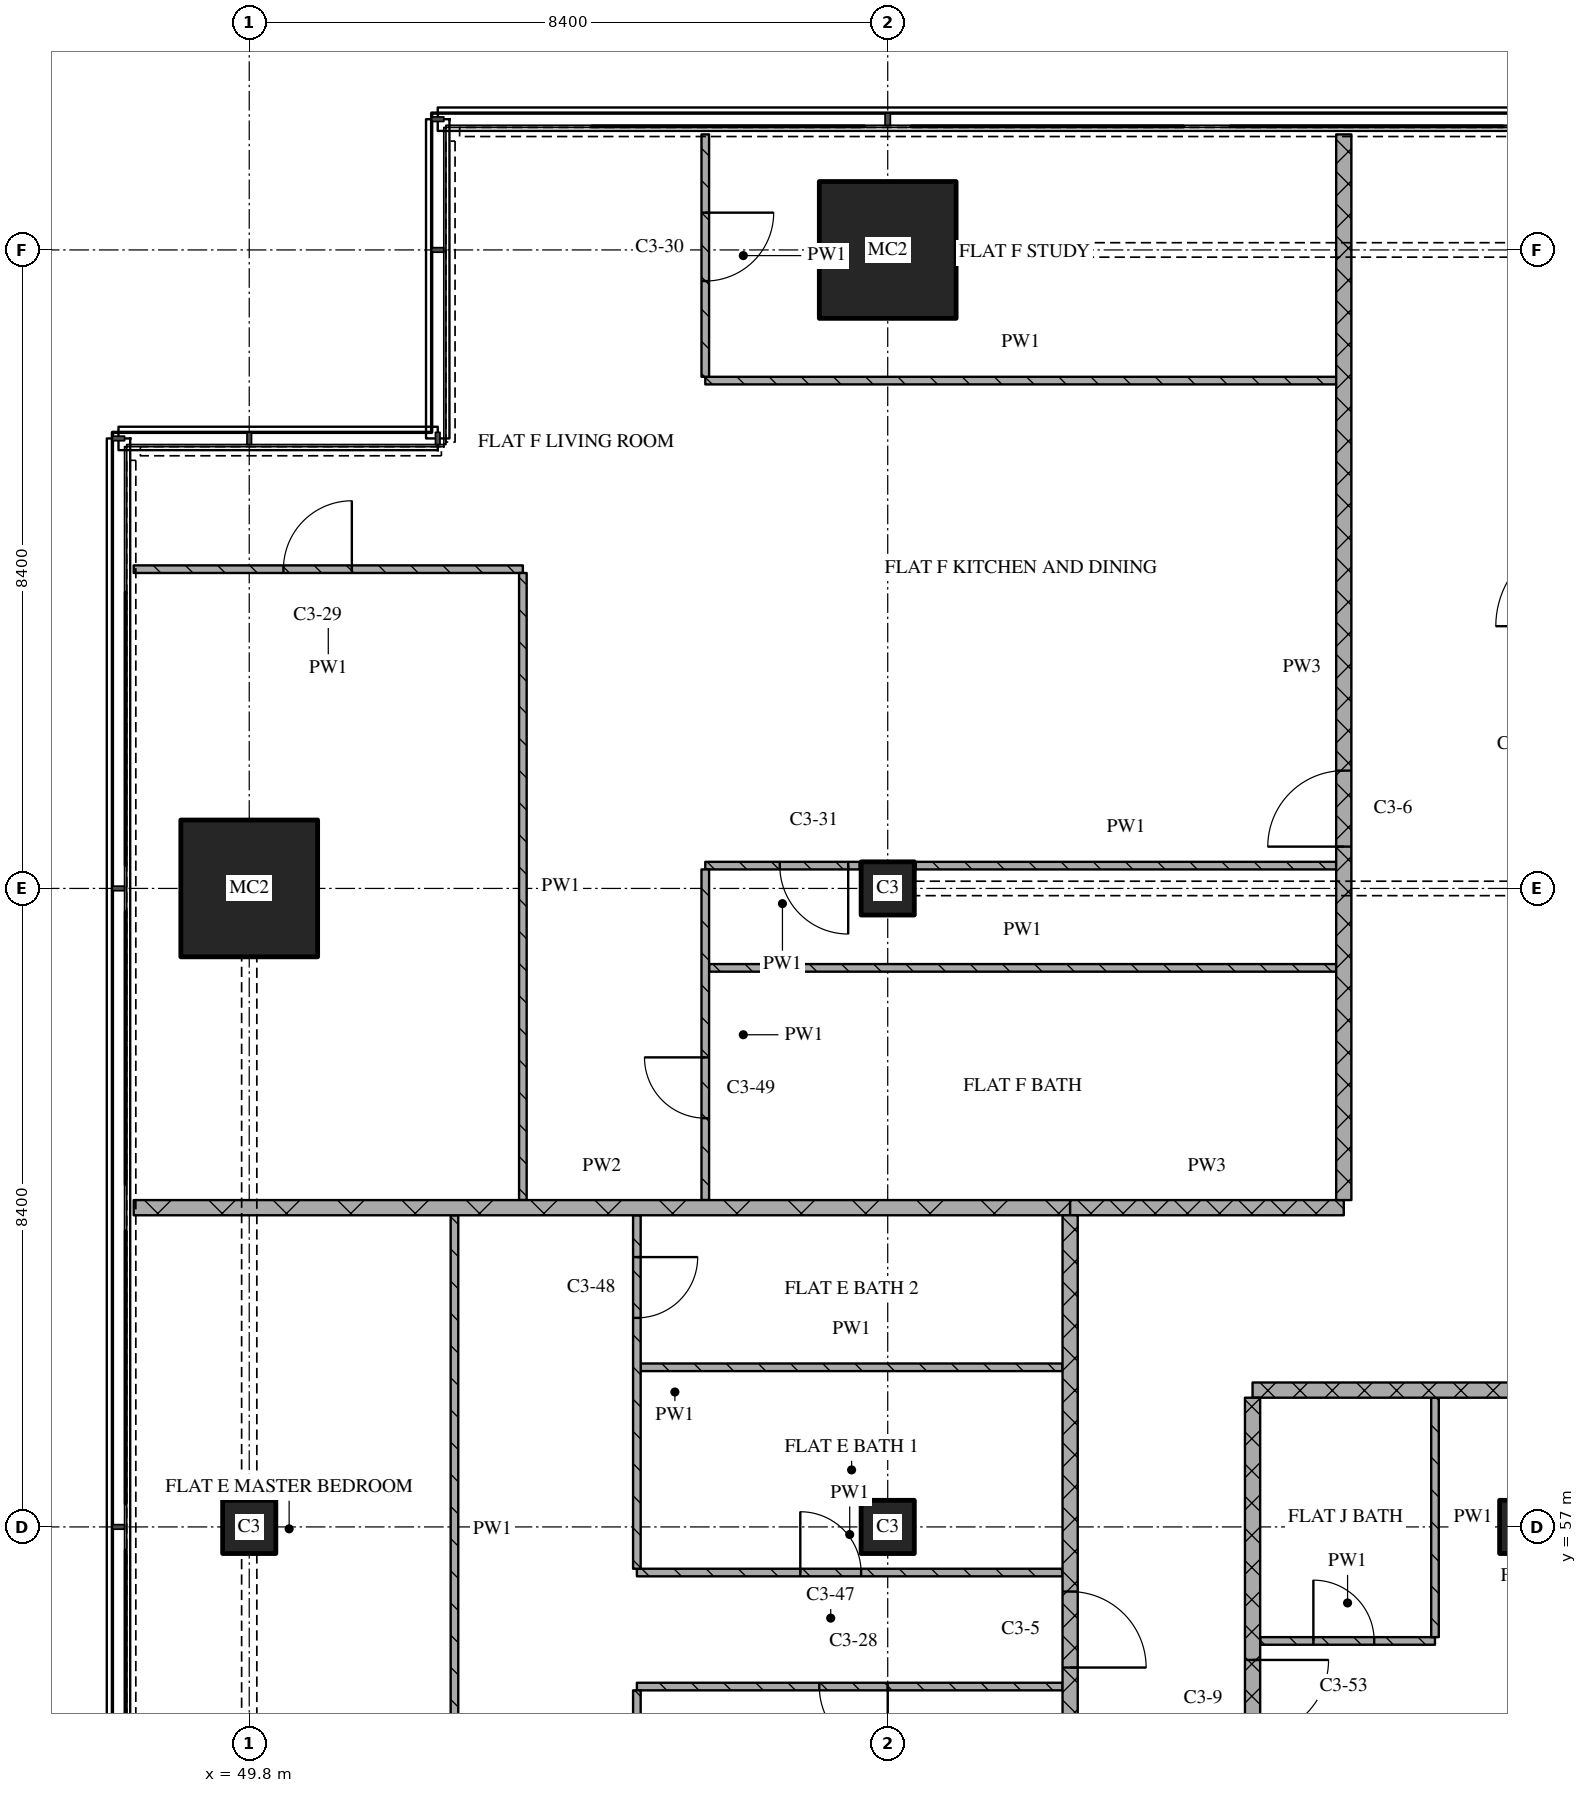
"""IFC4 building model, lengths in metres.
Left out: names, types, materials, properties, quantities, classifications, styles, units other than length and angle.
Written with IfcOpenShell. Run it as: python <this file> out.ifc"""

import sys

from ifc_helpers import new_model, si_unit, direction, frame, frame_2d, origin, origin_2d, place, context, subcontext, project, spatial, rectangle, extrude, element, fill, save


model = new_model("IFC4")
c1 = context("Model", 3, precision=1e-05, world=origin(), true_north=direction((0.0, 1.0)))
c2 = subcontext(c1, "Body", "Model", "MODEL_VIEW")
j1 = project(units=[si_unit("LENGTHUNIT", "METRE"), si_unit("PLANEANGLEUNIT", "RADIAN")], contexts=[c1])
p1 = place(None, origin())
s1 = spatial("IfcSite", under=j1, at=p1, CompositionType="ELEMENT")
p2 = place(p1, origin())
s2 = spatial("IfcBuilding", under=s1, at=p2, CompositionType="ELEMENT")
p3 = place(p2, frame((0.0, 0.0, 172.65)))
s3 = spatial("IfcBuildingStorey", under=s2, at=p3, CompositionType="ELEMENT", Elevation=172.65)
p4 = place(p3, frame((49.8, 57.0, 0.0), z_axis=(0.0, 0.0, 1.0), x_axis=(1.0, 0.0, 0.0)))
e1 = element("IfcColumn", 1, at=p4, inside=s3, PredefinedType="COLUMN", context=c2, shape_type="SweptSolid", body=[
    extrude(rectangle(XDim=0.7, YDim=0.7, at=origin_2d()), origin(), (0.0, 0.0, 1.0), 3.6),
])
p5 = place(p3, frame((49.8, 65.4, 0.0), z_axis=(0.0, 0.0, 1.0), x_axis=(1.0, 0.0, 0.0)))
e2 = element("IfcColumn", 2, at=p5, inside=s3, PredefinedType="COLUMN", context=c2, shape_type="SweptSolid", body=[
    extrude(rectangle(XDim=1.8, YDim=1.8, at=origin_2d()), origin(), (0.0, 0.0, 1.0), 3.6),
])
for number, where, z_axis, x_axis in (
    (3, (58.2, 57.0, 0.0), (0.0, 0.0, 1.0), (1.0, 0.0, 0.0)),
    (4, (58.2, 65.4, 0.0), (0.0, 0.0, 1.0), (1.0, 0.0, 0.0)),
):
    element("IfcColumn", number, at=place(p3, frame(where, z_axis=z_axis, x_axis=x_axis)), inside=s3, PredefinedType="COLUMN", context=c2, shape_type="SweptSolid", body=[
        extrude(rectangle(XDim=0.7, YDim=0.7, at=origin_2d()), origin(), (0.0, 0.0, 1.0), 3.6),
    ])
p6 = place(p3, frame((58.2, 73.8, 0.0), z_axis=(0.0, 0.0, 1.0), x_axis=(1.0, 0.0, 0.0)))
e5 = element("IfcColumn", 5, at=p6, inside=s3, PredefinedType="COLUMN", context=c2, shape_type="SweptSolid", body=[
    extrude(rectangle(XDim=1.8, YDim=1.8, at=origin_2d()), origin(), (0.0, 0.0, 1.0), 3.6),
])
p7 = place(p3, frame((66.6, 57.0, 0.0), z_axis=(0.0, 0.0, 1.0), x_axis=(1.0, 0.0, 0.0)))
e6 = element("IfcColumn", 6, at=p7, inside=s3, PredefinedType="COLUMN", context=c2, shape_type="SweptSolid", body=[
    extrude(rectangle(XDim=0.7, YDim=0.7, at=origin_2d()), origin(), (0.0, 0.0, 1.0), 3.6),
])
p8 = place(p3, frame((60.5, 54.9, 0.0), z_axis=(0.0, 0.0, 1.0), x_axis=(-1.0, 0.0, 0.0)))
e7 = element("IfcWall", 7, at=p8, inside=s3, PredefinedType="PARTITIONING", context=c2, shape_type="SweptSolid", body=[
    extrude(rectangle(XDim=5.6, YDim=0.1, at=frame_2d((2.8, 0.0))), origin(), (0.0, 0.0, 1.0), 3.32),
])
p9 = place(p8, frame((2.3, 0.0, 0.0)))
e8 = element("IfcOpeningElement", 8, at=p9, cuts=e7, PredefinedType="OPENING", context=c2, shape_type="SweptSolid", body=[
    extrude(rectangle(XDim=0.9, YDim=2.1, at=frame_2d((0.45, 1.05))), frame((0.0, 0.06, 0.0), z_axis=(0.0, -1.0, 0.0), x_axis=(1.0, 0.0, 0.0)), (0.0, 0.0, 1.0), 0.12),
])
p10 = place(p3, frame((63.1, 55.5, 0.0), z_axis=(0.0, 0.0, 1.0), x_axis=(1.0, 0.0, 0.0)))
e9 = element("IfcWall", 9, at=p10, inside=s3, PredefinedType="PARTITIONING", context=c2, shape_type="SweptSolid", body=[
    extrude(rectangle(XDim=2.3, YDim=0.1, at=frame_2d((1.15, 0.0))), origin(), (0.0, 0.0, 1.0), 3.32),
])
p11 = place(p10, frame((0.7, 0.0, 0.0)))
e10 = element("IfcOpeningElement", 10, at=p11, cuts=e9, PredefinedType="OPENING", context=c2, shape_type="SweptSolid", body=[
    extrude(rectangle(XDim=0.8, YDim=2.1, at=frame_2d((0.4, 1.05))), frame((0.0, 0.06, 0.0), z_axis=(0.0, -1.0, 0.0), x_axis=(1.0, 0.0, 0.0)), (0.0, 0.0, 1.0), 0.12),
])
p12 = place(p3, frame((54.9, 56.4, 0.0), z_axis=(0.0, 0.0, 1.0), x_axis=(1.0, 0.0, 0.0)))
e11 = element("IfcWall", 11, at=p12, inside=s3, PredefinedType="PARTITIONING", context=c2, shape_type="SweptSolid", body=[
    extrude(rectangle(XDim=5.6, YDim=0.1, at=frame_2d((2.8, 0.0))), origin(), (0.0, 0.0, 1.0), 3.32),
])
p13 = place(p12, frame((2.15, 0.0, 0.0)))
e12 = element("IfcOpeningElement", 12, at=p13, cuts=e11, PredefinedType="OPENING", context=c2, shape_type="SweptSolid", body=[
    extrude(rectangle(XDim=0.8, YDim=2.1, at=frame_2d((0.4, 1.05))), frame((0.0, 0.06, 0.0), z_axis=(0.0, -1.0, 0.0), x_axis=(1.0, 0.0, 0.0)), (0.0, 0.0, 1.0), 0.12),
])
p14 = place(p3, frame((63.0, 58.8, 0.0), z_axis=(0.0, 0.0, 1.0), x_axis=(1.0, 0.0, 0.0)))
e13 = element("IfcWall", 13, at=p14, inside=s3, PredefinedType="PARTITIONING", context=c2, shape_type="SweptSolid", body=[
    extrude(rectangle(XDim=10.8, YDim=0.2, at=frame_2d((5.4, 0.0))), origin(), (0.0, 0.0, 1.0), 3.32),
])
p15 = place(p3, frame((54.95, 59.1, 0.0), z_axis=(0.0, 0.0, 1.0), x_axis=(1.0, 0.0, 0.0)))
e14 = element("IfcWall", 14, at=p15, inside=s3, PredefinedType="PARTITIONING", context=c2, shape_type="SweptSolid", body=[
    extrude(rectangle(XDim=5.55, YDim=0.1, at=frame_2d((2.775, 0.0))), origin(), (0.0, 0.0, 1.0), 3.32),
])
p16 = place(p3, frame((60.6, 61.2, 0.0), z_axis=(0.0, 0.0, 1.0), x_axis=(1.0, 0.0, 0.0)))
e15 = element("IfcWall", 15, at=p16, inside=s3, PredefinedType="PARTITIONING", context=c2, shape_type="SweptSolid", body=[
    extrude(rectangle(XDim=3.6, YDim=0.2, at=frame_2d((1.8, 0.0))), origin(), (0.0, 0.0, 1.0), 3.32),
])
p17 = place(p3, frame((48.28, 61.2, 0.0), z_axis=(0.0, 0.0, 1.0), x_axis=(1.0, 0.0, 0.0)))
e16 = element("IfcWall", 16, at=p17, inside=s3, PredefinedType="PARTITIONING", context=c2, shape_type="SweptSolid", body=[
    extrude(rectangle(XDim=12.32, YDim=0.2, at=frame_2d((6.16, 0.0))), origin(), (0.0, 0.0, 1.0), 3.32),
])
p18 = place(p3, frame((55.85, 64.355, 0.0), z_axis=(0.0, 0.0, 1.0), x_axis=(1.0, 0.0, 0.0)))
e17 = element("IfcWall", 17, at=p18, inside=s3, PredefinedType="PARTITIONING", context=c2, shape_type="SweptSolid", body=[
    extrude(rectangle(XDim=8.25, YDim=0.1, at=frame_2d((4.125, 0.0))), origin(), (0.0, 0.0, 1.0), 3.32),
])
p19 = place(p3, frame((57.83, 65.7, 0.0), z_axis=(0.0, 0.0, 1.0), x_axis=(-1.0, 0.0, 0.0)))
e18 = element("IfcWall", 18, at=p19, inside=s3, PredefinedType="PARTITIONING", context=c2, shape_type="SweptSolid", body=[
    extrude(rectangle(XDim=2.03, YDim=0.1, at=frame_2d((1.015, 0.0))), origin(), (0.0, 0.0, 1.0), 3.32),
])
p20 = place(p19, frame((0.15, 0.0, 0.0)))
e19 = element("IfcOpeningElement", 19, at=p20, cuts=e18, PredefinedType="OPENING", context=c2, shape_type="SweptSolid", body=[
    extrude(rectangle(XDim=0.9, YDim=2.1, at=frame_2d((0.45, 1.05))), frame((0.0, 0.06, 0.0), z_axis=(0.0, -1.0, 0.0), x_axis=(1.0, 0.0, 0.0)), (0.0, 0.0, 1.0), 0.12),
])
p21 = place(p3, frame((58.57, 65.7, 0.0), z_axis=(0.0, 0.0, 1.0), x_axis=(1.0, 0.0, 0.0)))
e20 = element("IfcWall", 20, at=p21, inside=s3, PredefinedType="PARTITIONING", context=c2, shape_type="SweptSolid", body=[
    extrude(rectangle(XDim=5.53, YDim=0.1, at=frame_2d((2.765, 0.0))), origin(), (0.0, 0.0, 1.0), 3.32),
])
p22 = place(p3, frame((53.4, 69.6, 0.0), z_axis=(0.0, 0.0, 1.0), x_axis=(-1.0, 0.0, 0.0)))
e21 = element("IfcWall", 21, at=p22, inside=s3, PredefinedType="PARTITIONING", context=c2, shape_type="SweptSolid", body=[
    extrude(rectangle(XDim=5.12, YDim=0.1, at=frame_2d((2.56, 0.0))), origin(), (0.0, 0.0, 1.0), 3.32),
])
p23 = place(p22, frame((2.25, 0.0, 0.0)))
e22 = element("IfcOpeningElement", 22, at=p23, cuts=e21, PredefinedType="OPENING", context=c2, shape_type="SweptSolid", body=[
    extrude(rectangle(XDim=0.9, YDim=2.1, at=frame_2d((0.45, 1.05))), frame((0.0, 0.06, 0.0), z_axis=(0.0, -1.0, 0.0), x_axis=(1.0, 0.0, 0.0)), (0.0, 0.0, 1.0), 0.12),
])
p24 = place(p3, frame((55.8, 72.081, 0.0), z_axis=(0.0, 0.0, 1.0), x_axis=(1.0, 0.0, 0.0)))
e23 = element("IfcWall", 23, at=p24, inside=s3, PredefinedType="PARTITIONING", context=c2, shape_type="SweptSolid", body=[
    extrude(rectangle(XDim=8.3, YDim=0.1, at=frame_2d((4.15, 0.0))), origin(), (0.0, 0.0, 1.0), 3.32),
])
for number, where, z_axis, x_axis in (
    (24, (52.5, 61.1, 0.0), (0.0, 0.0, 1.0), (0.0, -1.0, 0.0)),
    (25, (53.4, 69.55, 0.0), (0.0, 0.0, 1.0), (0.0, -1.0, 0.0)),
):
    element("IfcWall", number, at=place(p3, frame(where, z_axis=z_axis, x_axis=x_axis)), inside=s3, PredefinedType="PARTITIONING", context=c2, shape_type="SweptSolid", body=[
        extrude(rectangle(XDim=8.25, YDim=0.1, at=frame_2d((4.125, 0.0))), origin(), (0.0, 0.0, 1.0), 3.32),
    ])
p25 = place(p3, frame((54.9, 54.85, 0.0), z_axis=(0.0, 0.0, 1.0), x_axis=(0.0, -1.0, 0.0)))
e26 = element("IfcWall", 26, at=p25, inside=s3, PredefinedType="PARTITIONING", context=c2, shape_type="SweptSolid", body=[
    extrude(rectangle(XDim=4.407, YDim=0.1, at=frame_2d((2.204, 0.0))), origin(), (0.0, 0.0, 1.0), 3.32),
])
p26 = place(p3, frame((54.9, 61.1, 0.0), z_axis=(0.0, 0.0, 1.0), x_axis=(0.0, -1.0, 0.0)))
e27 = element("IfcWall", 27, at=p26, inside=s3, PredefinedType="PARTITIONING", context=c2, shape_type="SweptSolid", body=[
    extrude(rectangle(XDim=4.65, YDim=0.1, at=frame_2d((2.325, 0.0))), origin(), (0.0, 0.0, 1.0), 3.32),
])
p27 = place(p26, frame((0.55, 0.0, 0.0)))
e28 = element("IfcOpeningElement", 28, at=p27, cuts=e27, PredefinedType="OPENING", context=c2, shape_type="SweptSolid", body=[
    extrude(rectangle(XDim=0.8, YDim=2.1, at=frame_2d((0.4, 1.05))), frame((0.0, 0.06, 0.0), z_axis=(0.0, -1.0, 0.0), x_axis=(1.0, 0.0, 0.0)), (0.0, 0.0, 1.0), 0.12),
])
p28 = place(p3, frame((55.8, 65.65, 0.0), z_axis=(0.0, 0.0, 1.0), x_axis=(0.0, -1.0, 0.0)))
e29 = element("IfcWall", 29, at=p28, inside=s3, PredefinedType="PARTITIONING", context=c2, shape_type="SweptSolid", body=[
    extrude(rectangle(XDim=4.35, YDim=0.1, at=frame_2d((2.175, 0.0))), origin(), (0.0, 0.0, 1.0), 3.32),
])
p29 = place(p28, frame((2.473, 0.0, 0.0)))
e30 = element("IfcOpeningElement", 30, at=p29, cuts=e29, PredefinedType="OPENING", context=c2, shape_type="SweptSolid", body=[
    extrude(rectangle(XDim=0.8, YDim=2.1, at=frame_2d((0.4, 1.05))), frame((0.0, 0.06, 0.0), z_axis=(0.0, -1.0, 0.0), x_axis=(1.0, 0.0, 0.0)), (0.0, 0.0, 1.0), 0.12),
])
p30 = place(p3, frame((55.8, 75.32, 0.0), z_axis=(0.0, 0.0, 1.0), x_axis=(0.0, -1.0, 0.0)))
e31 = element("IfcWall", 31, at=p30, inside=s3, PredefinedType="PARTITIONING", context=c2, shape_type="SweptSolid", body=[
    extrude(rectangle(XDim=3.189, YDim=0.1, at=frame_2d((1.594, 0.0))), origin(), (0.0, 0.0, 1.0), 3.32),
])
p31 = place(p30, frame((1.03, 0.0, 0.0)))
e32 = element("IfcOpeningElement", 32, at=p31, cuts=e31, PredefinedType="OPENING", context=c2, shape_type="SweptSolid", body=[
    extrude(rectangle(XDim=0.9, YDim=2.1, at=frame_2d((0.45, 1.05))), frame((0.0, 0.06, 0.0), z_axis=(0.0, -1.0, 0.0), x_axis=(1.0, 0.0, 0.0)), (0.0, 0.0, 1.0), 0.12),
])
p32 = place(p3, frame((60.6, 43.3, 0.0), z_axis=(0.0, 0.0, 1.0), x_axis=(0.0, 1.0, 0.0)))
e33 = element("IfcWall", 33, at=p32, inside=s3, PredefinedType="PARTITIONING", context=c2, shape_type="SweptSolid", body=[
    extrude(rectangle(XDim=17.8, YDim=0.2, at=frame_2d((8.9, 0.0))), origin(), (0.0, 0.0, 1.0), 3.32),
])
p33 = place(p32, frame((11.85, 0.0, 0.0)))
e34 = element("IfcOpeningElement", 34, at=p33, cuts=e33, PredefinedType="OPENING", context=c2, shape_type="SweptSolid", body=[
    extrude(rectangle(XDim=1.0, YDim=2.1, at=frame_2d((0.5, 1.05))), frame((0.0, 0.11, 0.0), z_axis=(0.0, -1.0, 0.0), x_axis=(1.0, 0.0, 0.0)), (0.0, 0.0, 1.0), 0.22),
])
p34 = place(p3, frame((63.0, 58.7, 0.0), z_axis=(0.0, 0.0, 1.0), x_axis=(0.0, -1.0, 0.0)))
e35 = element("IfcWall", 35, at=p34, inside=s3, PredefinedType="PARTITIONING", context=c2, shape_type="SweptSolid", body=[
    extrude(rectangle(XDim=15.4, YDim=0.2, at=frame_2d((7.7, 0.0))), origin(), (0.0, 0.0, 1.0), 3.32),
])
p35 = place(p34, frame((3.45, 0.0, 0.0)))
e36 = element("IfcOpeningElement", 36, at=p35, cuts=e35, PredefinedType="OPENING", context=c2, shape_type="SweptSolid", body=[
    extrude(rectangle(XDim=1.0, YDim=2.1, at=frame_2d((0.5, 1.05))), frame((0.0, 0.11, 0.0), z_axis=(0.0, -1.0, 0.0), x_axis=(1.0, 0.0, 0.0)), (0.0, 0.0, 1.0), 0.22),
])
p36 = place(p34, frame((11.25, 0.0, 0.0)))
e37 = element("IfcOpeningElement", 37, at=p36, cuts=e35, PredefinedType="OPENING", context=c2, shape_type="SweptSolid", body=[
    extrude(rectangle(XDim=0.9, YDim=2.1, at=frame_2d((0.45, 1.05))), frame((0.0, 0.11, 0.0), z_axis=(0.0, -1.0, 0.0), x_axis=(1.0, 0.0, 0.0)), (0.0, 0.0, 1.0), 0.22),
])
p37 = place(p3, frame((64.2, 61.3, 0.0), z_axis=(0.0, 0.0, 1.0), x_axis=(0.0, 1.0, 0.0)))
e38 = element("IfcWall", 38, at=p37, inside=s3, PredefinedType="PARTITIONING", context=c2, shape_type="SweptSolid", body=[
    extrude(rectangle(XDim=14.02, YDim=0.2, at=frame_2d((7.01, 0.0))), origin(), (0.0, 0.0, 1.0), 3.32),
])
p38 = place(p37, frame((4.65, 0.0, 0.0)))
e39 = element("IfcOpeningElement", 39, at=p38, cuts=e38, PredefinedType="OPENING", context=c2, shape_type="SweptSolid", body=[
    extrude(rectangle(XDim=1.0, YDim=2.1, at=frame_2d((0.5, 1.05))), frame((0.0, 0.11, 0.0), z_axis=(0.0, -1.0, 0.0), x_axis=(1.0, 0.0, 0.0)), (0.0, 0.0, 1.0), 0.22),
])
p39 = place(p3, frame((65.4, 58.7, 0.0), z_axis=(0.0, 0.0, 1.0), x_axis=(0.0, -1.0, 0.0)))
e40 = element("IfcWall", 40, at=p39, inside=s3, PredefinedType="PARTITIONING", context=c2, shape_type="SweptSolid", body=[
    extrude(rectangle(XDim=3.15, YDim=0.1, at=frame_2d((1.575, 0.0))), origin(), (0.0, 0.0, 1.0), 3.32),
])
p40 = place(p9, origin())
e41 = element("IfcDoor", 41, at=p40, inside=s3, OperationType="SINGLE_SWING_LEFT", PredefinedType="DOOR", context=c2, shape_type="SweptSolid", body=[
    extrude(rectangle(XDim=0.9, YDim=2.1, at=frame_2d((0.45, 1.05))), frame((0.0, 0.025, 0.0), z_axis=(0.0, -1.0, 0.0), x_axis=(1.0, 0.0, 0.0)), (0.0, 0.0, 1.0), 0.05),
])
fill(e8, e41)
p41 = place(p11, origin())
e42 = element("IfcDoor", 42, at=p41, inside=s3, OperationType="SINGLE_SWING_LEFT", PredefinedType="DOOR", context=c2, shape_type="SweptSolid", body=[
    extrude(rectangle(XDim=0.8, YDim=2.1, at=frame_2d((0.4, 1.05))), frame((0.0, 0.025, 0.0), z_axis=(0.0, -1.0, 0.0), x_axis=(1.0, 0.0, 0.0)), (0.0, 0.0, 1.0), 0.05),
])
fill(e10, e42)
p42 = place(p13, origin())
e43 = element("IfcDoor", 43, at=p42, inside=s3, OperationType="SINGLE_SWING_LEFT", PredefinedType="DOOR", context=c2, shape_type="SweptSolid", body=[
    extrude(rectangle(XDim=0.8, YDim=2.1, at=frame_2d((0.4, 1.05))), frame((0.0, 0.025, 0.0), z_axis=(0.0, -1.0, 0.0), x_axis=(1.0, 0.0, 0.0)), (0.0, 0.0, 1.0), 0.05),
])
fill(e12, e43)
p43 = place(p20, origin())
e44 = element("IfcDoor", 44, at=p43, inside=s3, OperationType="SINGLE_SWING_LEFT", PredefinedType="DOOR", context=c2, shape_type="SweptSolid", body=[
    extrude(rectangle(XDim=0.9, YDim=2.1, at=frame_2d((0.45, 1.05))), frame((0.0, 0.025, 0.0), z_axis=(0.0, -1.0, 0.0), x_axis=(1.0, 0.0, 0.0)), (0.0, 0.0, 1.0), 0.05),
])
fill(e19, e44)
p44 = place(p23, origin())
e45 = element("IfcDoor", 45, at=p44, inside=s3, OperationType="SINGLE_SWING_RIGHT", PredefinedType="DOOR", context=c2, shape_type="SweptSolid", body=[
    extrude(rectangle(XDim=0.9, YDim=2.1, at=frame_2d((0.45, 1.05))), frame((0.0, 0.025, 0.0), z_axis=(0.0, -1.0, 0.0), x_axis=(1.0, 0.0, 0.0)), (0.0, 0.0, 1.0), 0.05),
])
fill(e22, e45)
p45 = place(p27, origin())
e46 = element("IfcDoor", 46, at=p45, inside=s3, OperationType="SINGLE_SWING_LEFT", PredefinedType="DOOR", context=c2, shape_type="SweptSolid", body=[
    extrude(rectangle(XDim=0.8, YDim=2.1, at=frame_2d((0.4, 1.05))), frame((0.0, 0.025, 0.0), z_axis=(0.0, -1.0, 0.0), x_axis=(1.0, 0.0, 0.0)), (0.0, 0.0, 1.0), 0.05),
])
fill(e28, e46)
p46 = place(p29, origin())
e47 = element("IfcDoor", 47, at=p46, inside=s3, OperationType="SINGLE_SWING_RIGHT", PredefinedType="DOOR", context=c2, shape_type="SweptSolid", body=[
    extrude(rectangle(XDim=0.8, YDim=2.1, at=frame_2d((0.4, 1.05))), frame((0.0, 0.025, 0.0), z_axis=(0.0, -1.0, 0.0), x_axis=(1.0, 0.0, 0.0)), (0.0, 0.0, 1.0), 0.05),
])
fill(e30, e47)
p47 = place(p31, origin())
e48 = element("IfcDoor", 48, at=p47, inside=s3, OperationType="SINGLE_SWING_LEFT", PredefinedType="DOOR", context=c2, shape_type="SweptSolid", body=[
    extrude(rectangle(XDim=0.9, YDim=2.1, at=frame_2d((0.45, 1.05))), frame((0.0, 0.025, 0.0), z_axis=(0.0, -1.0, 0.0), x_axis=(1.0, 0.0, 0.0)), (0.0, 0.0, 1.0), 0.05),
])
fill(e32, e48)
p48 = place(p33, origin())
e49 = element("IfcDoor", 49, at=p48, inside=s3, OperationType="SINGLE_SWING_RIGHT", PredefinedType="DOOR", context=c2, shape_type="SweptSolid", body=[
    extrude(rectangle(XDim=1.0, YDim=2.1, at=frame_2d((0.5, 1.05))), frame((0.0, 0.025, 0.0), z_axis=(0.0, -1.0, 0.0), x_axis=(1.0, 0.0, 0.0)), (0.0, 0.0, 1.0), 0.05),
])
fill(e34, e49)
p49 = place(p35, origin())
e50 = element("IfcDoor", 50, at=p49, inside=s3, OperationType="SINGLE_SWING_LEFT", PredefinedType="DOOR", context=c2, shape_type="SweptSolid", body=[
    extrude(rectangle(XDim=1.0, YDim=2.1, at=frame_2d((0.5, 1.05))), frame((0.0, 0.025, 0.0), z_axis=(0.0, -1.0, 0.0), x_axis=(1.0, 0.0, 0.0)), (0.0, 0.0, 1.0), 0.05),
])
fill(e36, e50)
p50 = place(p38, origin())
e51 = element("IfcDoor", 51, at=p50, inside=s3, OperationType="SINGLE_SWING_LEFT", PredefinedType="DOOR", context=c2, shape_type="SweptSolid", body=[
    extrude(rectangle(XDim=1.0, YDim=2.1, at=frame_2d((0.5, 1.05))), frame((0.0, 0.025, 0.0), z_axis=(0.0, -1.0, 0.0), x_axis=(1.0, 0.0, 0.0)), (0.0, 0.0, 1.0), 0.05),
])
fill(e39, e51)
save(model, sys.argv[1])
